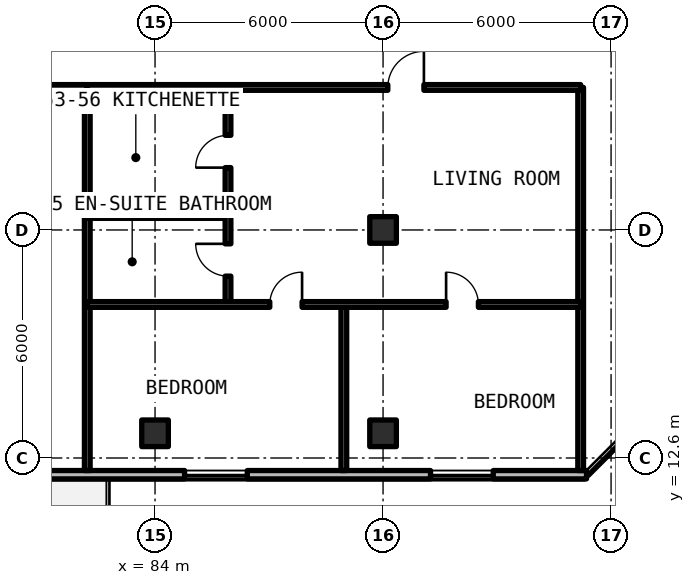
"""IFC4 building model, lengths in metres.
Left out: names, types, materials, properties, quantities, classifications, styles, units other than length and angle.
Written with IfcOpenShell. Run it as: python <this file> out.ifc"""

import sys

from ifc_helpers import new_model, si_unit, direction, frame, frame_2d, origin, origin_2d, place, context, subcontext, project, spatial, rectangle, extrude, element, fill, save


model = new_model("IFC4")
c1 = context("Model", 3, precision=1e-05, world=origin(), true_north=direction((0.0, 1.0)))
c2 = subcontext(c1, "Body", "Model", "MODEL_VIEW")
j1 = project(units=[si_unit("LENGTHUNIT", "METRE"), si_unit("PLANEANGLEUNIT", "RADIAN")], contexts=[c1])
p1 = place(None, origin())
s1 = spatial("IfcSite", under=j1, at=p1, CompositionType="ELEMENT")
p2 = place(p1, origin())
s2 = spatial("IfcBuilding", under=s1, at=p2, CompositionType="ELEMENT")
p3 = place(p2, frame((0.0, 0.0, 226.05)))
s3 = spatial("IfcBuildingStorey", under=s2, at=p3, CompositionType="ELEMENT", Elevation=226.05)
for number, where, z_axis, x_axis in (
    (1, (90.0, 18.6, 0.0), (0.0, 0.0, 1.0), (1.0, 0.0, 0.0)),
    (2, (84.0, 13.25, 0.0), (0.0, 0.0, 1.0), (1.0, 0.0, 0.0)),
    (3, (90.0, 13.25, 0.0), (0.0, 0.0, 1.0), (1.0, 0.0, 0.0)),
):
    element("IfcColumn", number, at=place(p3, frame(where, z_axis=z_axis, x_axis=x_axis)), inside=s3, PredefinedType="COLUMN", context=c2, shape_type="SweptSolid", body=[
        extrude(rectangle(XDim=0.7, YDim=0.7, at=origin_2d()), origin(), (0.0, 0.0, 1.0), 3.3),
    ])
p4 = place(p3, frame((52.11, 12.16, 0.0), z_axis=(0.0, 0.0, 1.0), x_axis=(1.0, 0.0, 0.0)))
e4 = element("IfcWall", 4, at=p4, inside=s3, PredefinedType="SOLIDWALL", context=c2, shape_type="SweptSolid", body=[
    extrude(rectangle(XDim=43.244, YDim=0.22, at=frame_2d((21.622, 0.0))), origin(), (0.0, 0.0, 1.0), 3.02),
])
p5 = place(p4, frame((15.69, 0.0, 0.0)))
e5 = element("IfcOpeningElement", 5, at=p5, cuts=e4, PredefinedType="OPENING", context=c2, shape_type="SweptSolid", body=[
    extrude(rectangle(XDim=1.1, YDim=2.15, at=frame_2d((0.55, 1.075))), frame((0.0, 0.12, 0.0), z_axis=(0.0, -1.0, 0.0), x_axis=(1.0, 0.0, 0.0)), (0.0, 0.0, 1.0), 0.24),
])
p6 = place(p4, frame((27.79, 0.0, 0.0)))
e6 = element("IfcOpeningElement", 6, at=p6, cuts=e4, PredefinedType="OPENING", context=c2, shape_type="SweptSolid", body=[
    extrude(rectangle(XDim=1.1, YDim=2.15, at=frame_2d((0.55, 1.075))), frame((0.0, 0.12, 0.0), z_axis=(0.0, -1.0, 0.0), x_axis=(1.0, 0.0, 0.0)), (0.0, 0.0, 1.0), 0.24),
])
p7 = place(p4, frame((2.726, 0.0, 0.78)))
e7 = element("IfcOpeningElement", 7, at=p7, cuts=e4, PredefinedType="OPENING", context=c2, shape_type="SweptSolid", body=[
    extrude(rectangle(XDim=1.65, YDim=1.66, at=frame_2d((0.825, 0.83))), frame((0.0, 0.12, 0.0), z_axis=(0.0, -1.0, 0.0), x_axis=(1.0, 0.0, 0.0)), (0.0, 0.0, 1.0), 0.24),
])
p8 = place(p4, frame((9.652, 0.0, 0.78)))
e8 = element("IfcOpeningElement", 8, at=p8, cuts=e4, PredefinedType="OPENING", context=c2, shape_type="SweptSolid", body=[
    extrude(rectangle(XDim=1.65, YDim=1.66, at=frame_2d((0.825, 0.83))), frame((0.0, 0.12, 0.0), z_axis=(0.0, -1.0, 0.0), x_axis=(1.0, 0.0, 0.0)), (0.0, 0.0, 1.0), 0.24),
])
p9 = place(p4, frame((32.667, 0.0, 0.78)))
e9 = element("IfcOpeningElement", 9, at=p9, cuts=e4, PredefinedType="OPENING", context=c2, shape_type="SweptSolid", body=[
    extrude(rectangle(XDim=1.65, YDim=1.66, at=frame_2d((0.825, 0.83))), frame((0.0, 0.12, 0.0), z_axis=(0.0, -1.0, 0.0), x_axis=(1.0, 0.0, 0.0)), (0.0, 0.0, 1.0), 0.24),
])
p10 = place(p4, frame((39.139, 0.0, 0.78)))
e10 = element("IfcOpeningElement", 10, at=p10, cuts=e4, PredefinedType="OPENING", context=c2, shape_type="SweptSolid", body=[
    extrude(rectangle(XDim=1.65, YDim=1.66, at=frame_2d((0.825, 0.83))), frame((0.0, 0.12, 0.0), z_axis=(0.0, -1.0, 0.0), x_axis=(1.0, 0.0, 0.0)), (0.0, 0.0, 1.0), 0.24),
])
for number, where, z_axis, x_axis in (
    (11, (95.2, 12.27, 0.0), (0.0, 0.0, 1.0), (0.0, 1.0, 0.0)),
    (12, (82.217, 12.27, 0.0), (0.0, 0.0, 1.0), (0.0, 1.0, 0.0)),
):
    element("IfcWall", number, at=place(p3, frame(where, z_axis=z_axis, x_axis=x_axis)), inside=s3, PredefinedType="SOLIDWALL", context=c2, shape_type="SweptSolid", body=[
        extrude(rectangle(XDim=10.08, YDim=0.15, at=frame_2d((5.04, 0.0))), origin(), (0.0, 0.0, 1.0), 2.35),
    ])
p11 = place(p3, frame((72.185, 22.35, 0.0), z_axis=(0.0, 0.0, 1.0), x_axis=(1.0, 0.0, 0.0)))
e13 = element("IfcWall", 13, at=p11, inside=s3, PredefinedType="SOLIDWALL", context=c2, shape_type="SweptSolid", body=[
    extrude(rectangle(XDim=10.032, YDim=0.15, at=frame_2d((5.016, 0.0))), origin(), (0.0, 0.0, 1.0), 2.35),
])
p12 = place(p11, frame((4.466, 0.0, 0.0)))
e14 = element("IfcOpeningElement", 14, at=p12, cuts=e13, PredefinedType="OPENING", context=c2, shape_type="SweptSolid", body=[
    extrude(rectangle(XDim=1.1, YDim=2.15, at=frame_2d((0.55, 1.075))), frame((0.0, 0.085, 0.0), z_axis=(0.0, -1.0, 0.0), x_axis=(1.0, 0.0, 0.0)), (0.0, 0.0, 1.0), 0.17),
])
p13 = place(p3, frame((82.217, 18.981, 0.0), z_axis=(0.0, 0.0, 1.0), x_axis=(1.0, 0.0, 0.0)))
e15 = element("IfcWall", 15, at=p13, inside=s3, PredefinedType="PARTITIONING", context=c2, shape_type="SweptSolid", body=[
    extrude(rectangle(XDim=3.703, YDim=0.15, at=frame_2d((1.852, 0.0))), origin(), (0.0, 0.0, 1.0), 2.35),
])
p14 = place(p3, frame((85.92, 16.64, 0.0), z_axis=(0.0, 0.0, 1.0), x_axis=(0.0, 1.0, 0.0)))
e16 = element("IfcWall", 16, at=p14, inside=s3, PredefinedType="PARTITIONING", context=c2, shape_type="SweptSolid", body=[
    extrude(rectangle(XDim=5.71, YDim=0.15, at=frame_2d((2.855, 0.0))), origin(), (0.0, 0.0, 1.0), 2.35),
])
p15 = place(p14, frame((0.746, 0.0, 0.0)))
e17 = element("IfcOpeningElement", 17, at=p15, cuts=e16, PredefinedType="OPENING", context=c2, shape_type="SweptSolid", body=[
    extrude(rectangle(XDim=0.85, YDim=2.1, at=frame_2d((0.425, 1.05))), frame((0.0, 0.085, 0.0), z_axis=(0.0, -1.0, 0.0), x_axis=(1.0, 0.0, 0.0)), (0.0, 0.0, 1.0), 0.17),
])
p16 = place(p14, frame((3.601, 0.0, 0.0)))
e18 = element("IfcOpeningElement", 18, at=p16, cuts=e16, PredefinedType="OPENING", context=c2, shape_type="SweptSolid", body=[
    extrude(rectangle(XDim=0.85, YDim=2.1, at=frame_2d((0.425, 1.05))), frame((0.0, 0.085, 0.0), z_axis=(0.0, -1.0, 0.0), x_axis=(1.0, 0.0, 0.0)), (0.0, 0.0, 1.0), 0.17),
])
p17 = place(p3, frame((88.968, 12.27, 0.0), z_axis=(0.0, 0.0, 1.0), x_axis=(0.0, 1.0, 0.0)))
e19 = element("IfcWall", 19, at=p17, inside=s3, PredefinedType="PARTITIONING", context=c2, shape_type="SweptSolid", body=[
    extrude(rectangle(XDim=4.37, YDim=0.15, at=frame_2d((2.185, 0.0))), origin(), (0.0, 0.0, 1.0), 2.35),
])
p18 = place(p3, frame((82.217, 16.64, 0.0), z_axis=(0.0, 0.0, 1.0), x_axis=(1.0, 0.0, 0.0)))
e20 = element("IfcWall", 20, at=p18, inside=s3, PredefinedType="PARTITIONING", context=c2, shape_type="SweptSolid", body=[
    extrude(rectangle(XDim=12.983, YDim=0.15, at=frame_2d((6.492, 0.0))), origin(), (0.0, 0.0, 1.0), 2.35),
])
p19 = place(p18, frame((4.802, 0.0, 0.0)))
e21 = element("IfcOpeningElement", 21, at=p19, cuts=e20, PredefinedType="OPENING", context=c2, shape_type="SweptSolid", body=[
    extrude(rectangle(XDim=0.85, YDim=2.1, at=frame_2d((0.425, 1.05))), frame((0.0, 0.085, 0.0), z_axis=(0.0, -1.0, 0.0), x_axis=(1.0, 0.0, 0.0)), (0.0, 0.0, 1.0), 0.17),
])
p20 = place(p18, frame((9.442, 0.0, 0.0)))
e22 = element("IfcOpeningElement", 22, at=p20, cuts=e20, PredefinedType="OPENING", context=c2, shape_type="SweptSolid", body=[
    extrude(rectangle(XDim=0.85, YDim=2.1, at=frame_2d((0.425, 1.05))), frame((0.0, 0.085, 0.0), z_axis=(0.0, -1.0, 0.0), x_axis=(1.0, 0.0, 0.0)), (0.0, 0.0, 1.0), 0.17),
])
p21 = place(p3, frame((82.217, 22.35, 0.0), z_axis=(0.0, 0.0, 1.0), x_axis=(1.0, 0.0, 0.0)))
e23 = element("IfcWall", 23, at=p21, inside=s3, PredefinedType="SOLIDWALL", context=c2, shape_type="SweptSolid", body=[
    extrude(rectangle(XDim=12.983, YDim=0.15, at=frame_2d((6.492, 0.0))), origin(), (0.0, 0.0, 1.0), 2.35),
])
p22 = place(p21, frame((7.908, 0.0, 0.0)))
e24 = element("IfcOpeningElement", 24, at=p22, cuts=e23, PredefinedType="OPENING", context=c2, shape_type="SweptSolid", body=[
    extrude(rectangle(XDim=0.95, YDim=2.15, at=frame_2d((0.475, 1.075))), frame((0.0, 0.085, 0.0), z_axis=(0.0, -1.0, 0.0), x_axis=(1.0, 0.0, 0.0)), (0.0, 0.0, 1.0), 0.17),
])
p23 = place(p9, origin())
e25 = element("IfcWindow", 25, at=p23, inside=s3, PartitioningType="SINGLE_PANEL", PredefinedType="WINDOW", context=c2, shape_type="SweptSolid", body=[
    extrude(rectangle(XDim=1.65, YDim=1.66, at=frame_2d((0.825, 0.83))), frame((0.0, 0.03, 0.0), z_axis=(0.0, -1.0, 0.0), x_axis=(1.0, 0.0, 0.0)), (0.0, 0.0, 1.0), 0.06),
])
fill(e9, e25)
p24 = place(p10, origin())
e26 = element("IfcWindow", 26, at=p24, inside=s3, PartitioningType="SINGLE_PANEL", PredefinedType="WINDOW", context=c2, shape_type="SweptSolid", body=[
    extrude(rectangle(XDim=1.65, YDim=1.66, at=frame_2d((0.825, 0.83))), frame((0.0, 0.03, 0.0), z_axis=(0.0, -1.0, 0.0), x_axis=(1.0, 0.0, 0.0)), (0.0, 0.0, 1.0), 0.06),
])
fill(e10, e26)
p25 = place(p15, origin())
e27 = element("IfcDoor", 27, at=p25, inside=s3, OperationType="SINGLE_SWING_RIGHT", PredefinedType="DOOR", context=c2, shape_type="SweptSolid", body=[
    extrude(rectangle(XDim=0.85, YDim=2.1, at=frame_2d((0.425, 1.05))), frame((0.0, 0.025, 0.0), z_axis=(0.0, -1.0, 0.0), x_axis=(1.0, 0.0, 0.0)), (0.0, 0.0, 1.0), 0.05),
])
fill(e17, e27)
p26 = place(p16, origin())
e28 = element("IfcDoor", 28, at=p26, inside=s3, OperationType="SINGLE_SWING_LEFT", PredefinedType="DOOR", context=c2, shape_type="SweptSolid", body=[
    extrude(rectangle(XDim=0.85, YDim=2.1, at=frame_2d((0.425, 1.05))), frame((0.0, 0.025, 0.0), z_axis=(0.0, -1.0, 0.0), x_axis=(1.0, 0.0, 0.0)), (0.0, 0.0, 1.0), 0.05),
])
fill(e18, e28)
p27 = place(p19, origin())
e29 = element("IfcDoor", 29, at=p27, inside=s3, OperationType="SINGLE_SWING_RIGHT", PredefinedType="DOOR", context=c2, shape_type="SweptSolid", body=[
    extrude(rectangle(XDim=0.85, YDim=2.1, at=frame_2d((0.425, 1.05))), frame((0.0, 0.025, 0.0), z_axis=(0.0, -1.0, 0.0), x_axis=(1.0, 0.0, 0.0)), (0.0, 0.0, 1.0), 0.05),
])
fill(e21, e29)
p28 = place(p20, origin())
e30 = element("IfcDoor", 30, at=p28, inside=s3, OperationType="SINGLE_SWING_LEFT", PredefinedType="DOOR", context=c2, shape_type="SweptSolid", body=[
    extrude(rectangle(XDim=0.85, YDim=2.1, at=frame_2d((0.425, 1.05))), frame((0.0, 0.025, 0.0), z_axis=(0.0, -1.0, 0.0), x_axis=(1.0, 0.0, 0.0)), (0.0, 0.0, 1.0), 0.05),
])
fill(e22, e30)
p29 = place(p22, origin())
e31 = element("IfcDoor", 31, at=p29, inside=s3, OperationType="SINGLE_SWING_RIGHT", PredefinedType="DOOR", context=c2, shape_type="SweptSolid", body=[
    extrude(rectangle(XDim=0.95, YDim=2.15, at=frame_2d((0.475, 1.075))), frame((0.0, 0.025, 0.0), z_axis=(0.0, -1.0, 0.0), x_axis=(1.0, 0.0, 0.0)), (0.0, 0.0, 1.0), 0.05),
])
fill(e24, e31)
save(model, sys.argv[1])
